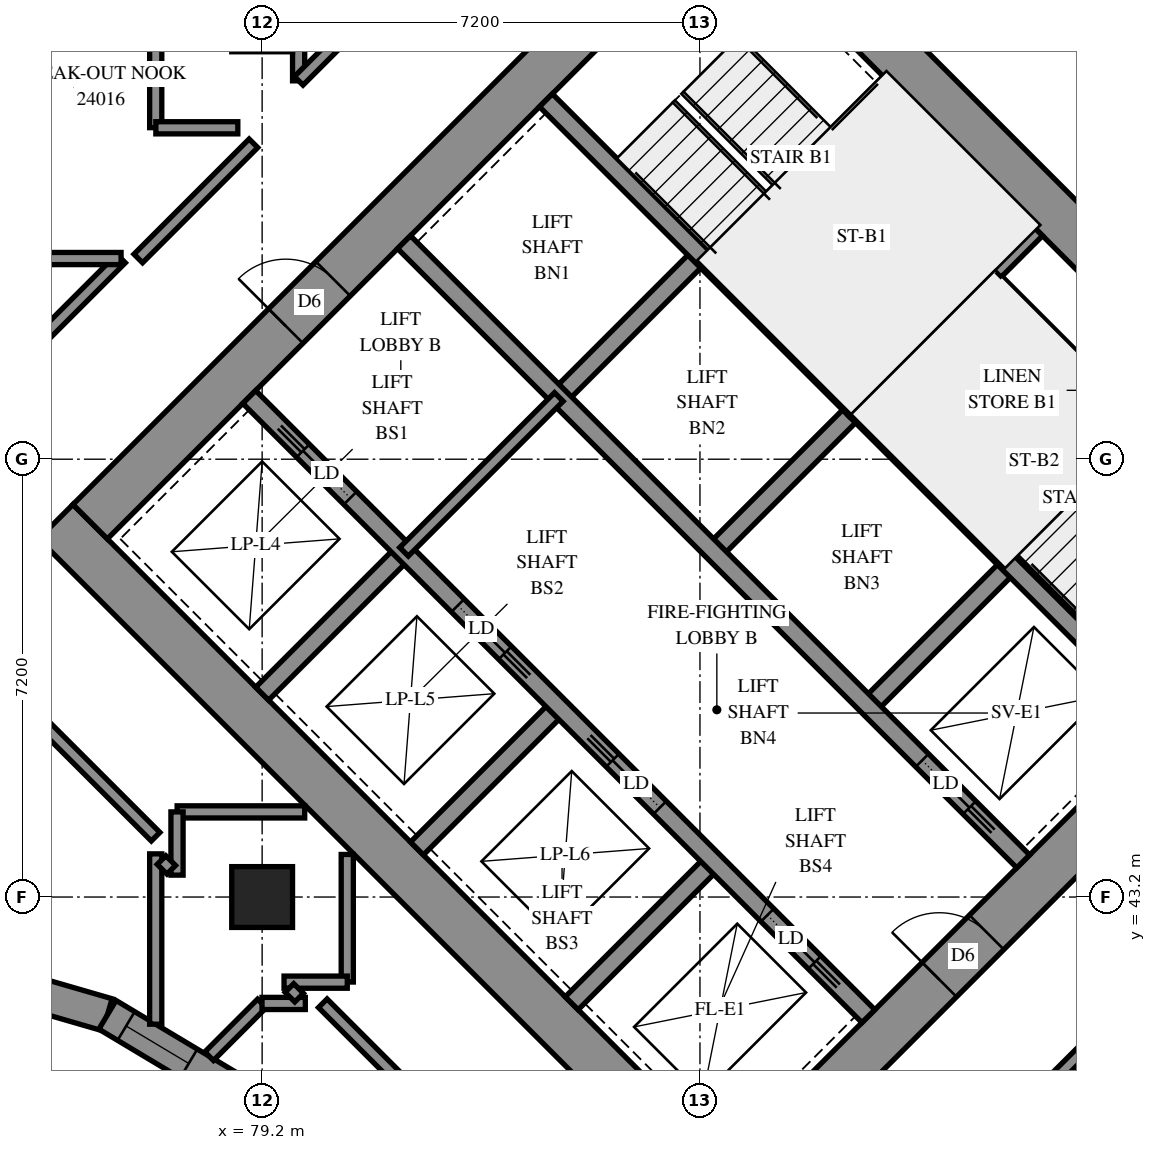
"""IFC4 building model, lengths in metres.
Left out: names, types, materials, properties, quantities, classifications, styles, units other than length and angle.
Written with IfcOpenShell. Run it as: python <this file> out.ifc"""

import sys

from ifc_helpers import new_model, si_unit, direction, frame, frame_2d, origin, origin_2d, place, context, subcontext, project, spatial, polyline, rectangle, outline, extrude, element, fill, save


model = new_model("IFC4")
c1 = context("Model", 3, precision=1e-05, world=origin(), true_north=direction((0.0, 1.0)))
c2 = subcontext(c1, "Body", "Model", "MODEL_VIEW")
j1 = project(units=[si_unit("LENGTHUNIT", "METRE"), si_unit("PLANEANGLEUNIT", "RADIAN")], contexts=[c1])
p1 = place(None, origin())
s1 = spatial("IfcSite", under=j1, at=p1, CompositionType="ELEMENT")
p2 = place(p1, origin())
s2 = spatial("IfcBuilding", under=s1, at=p2, CompositionType="ELEMENT")
p3 = place(p2, frame((0.0, 0.0, 91.4)))
s3 = spatial("IfcBuildingStorey", under=s2, at=p3, CompositionType="ELEMENT", Elevation=91.4)
p4 = place(p3, frame((79.2, 43.2, 0.0), z_axis=(0.0, 0.0, 1.0), x_axis=(1.0, 0.0, 0.0)))
e1 = element("IfcColumn", 1, at=p4, inside=s3, PredefinedType="COLUMN", context=c2, shape_type="SweptSolid", body=[
    extrude(rectangle(XDim=1.0, YDim=1.0, at=origin_2d()), origin(), (0.0, 0.0, 1.0), 3.1),
])
p5 = place(p3, frame((75.806, 49.373, -0.3), z_axis=(0.0, 0.0, 1.0), x_axis=(0.7071067812, -0.7071067812, 0.0)))
e2 = element("IfcWall", 2, at=p5, inside=s3, PredefinedType="SHEAR", context=c2, shape_type="SweptSolid", body=[
    extrude(rectangle(XDim=16.0, YDim=0.8, at=frame_2d((8.0, 0.0))), origin(), (0.0, 0.0, 1.0), 2.7),
])
p6 = place(p3, frame((86.554, 60.121, -0.3), z_axis=(0.0, 0.0, 1.0), x_axis=(0.7071067812, -0.7071067812, 0.0)))
e3 = element("IfcWall", 3, at=p6, inside=s3, PredefinedType="SHEAR", context=c2, shape_type="SweptSolid", body=[
    extrude(rectangle(XDim=16.0, YDim=0.8, at=frame_2d((8.0, 0.0))), origin(), (0.0, 0.0, 1.0), 2.7),
])
p7 = place(p6, frame((10.8, 0.0, 0.3)))
e4 = element("IfcOpeningElement", 4, at=p7, cuts=e3, PredefinedType="OPENING", context=c2, shape_type="SweptSolid", body=[
    extrude(rectangle(XDim=0.8, YDim=2.1, at=frame_2d((0.4, 1.05))), frame((0.0, 0.41, 0.0), z_axis=(0.0, -1.0, 0.0), x_axis=(1.0, 0.0, 0.0)), (0.0, 0.0, 1.0), 0.82),
])
p8 = place(p3, frame((76.372, 49.373, -0.3), z_axis=(0.0, 0.0, 1.0), x_axis=(0.7071067812, 0.7071067812, 0.0)))
e5 = element("IfcWall", 5, at=p8, inside=s3, PredefinedType="SHEAR", context=c2, shape_type="SweptSolid", body=[
    extrude(rectangle(XDim=14.4, YDim=0.8, at=frame_2d((7.2, 0.0))), origin(), (0.0, 0.0, 1.0), 2.7),
])
p9 = place(p8, frame((4.55, 0.0, 0.3)))
e6 = element("IfcOpeningElement", 6, at=p9, cuts=e5, PredefinedType="OPENING", context=c2, shape_type="SweptSolid", body=[
    extrude(rectangle(XDim=1.1, YDim=2.1, at=frame_2d((0.55, 1.05))), frame((0.0, 0.41, 0.0), z_axis=(0.0, -1.0, 0.0), x_axis=(1.0, 0.0, 0.0)), (0.0, 0.0, 1.0), 0.82),
])
p10 = place(p8, frame((11.35, 0.0, 0.3)))
e7 = element("IfcOpeningElement", 7, at=p10, cuts=e5, PredefinedType="OPENING", context=c2, shape_type="SweptSolid", body=[
    extrude(rectangle(XDim=1.1, YDim=2.1, at=frame_2d((0.55, 1.05))), frame((0.0, 0.41, 0.0), z_axis=(0.0, -1.0, 0.0), x_axis=(1.0, 0.0, 0.0)), (0.0, 0.0, 1.0), 0.82),
])
p11 = place(p3, frame((87.12, 38.625, -0.3), z_axis=(0.0, 0.0, 1.0), x_axis=(0.7071067812, 0.7071067812, 0.0)))
e8 = element("IfcWall", 8, at=p11, inside=s3, PredefinedType="SHEAR", context=c2, shape_type="SweptSolid", body=[
    extrude(rectangle(XDim=14.4, YDim=0.8, at=frame_2d((7.2, 0.0))), origin(), (0.0, 0.0, 1.0), 2.7),
])
p12 = place(p11, frame((4.55, 0.0, 0.3)))
e9 = element("IfcOpeningElement", 9, at=p12, cuts=e8, PredefinedType="OPENING", context=c2, shape_type="SweptSolid", body=[
    extrude(rectangle(XDim=1.1, YDim=2.1, at=frame_2d((0.55, 1.05))), frame((0.0, 0.41, 0.0), z_axis=(0.0, -1.0, 0.0), x_axis=(1.0, 0.0, 0.0)), (0.0, 0.0, 1.0), 0.82),
])
p13 = place(p11, frame((11.35, 0.0, 0.3)))
e10 = element("IfcOpeningElement", 10, at=p13, cuts=e8, PredefinedType="OPENING", context=c2, shape_type="SweptSolid", body=[
    extrude(rectangle(XDim=1.1, YDim=2.1, at=frame_2d((0.55, 1.05))), frame((0.0, 0.41, 0.0), z_axis=(0.0, -1.0, 0.0), x_axis=(1.0, 0.0, 0.0)), (0.0, 0.0, 1.0), 0.82),
])
for number, where, z_axis, x_axis in (
    (11, (79.2, 46.544, 0.0), (0.0, 0.0, 1.0), (0.707, 0.707, 0.0)),
    (12, (84.079, 51.423, 0.0), (0.0, 0.0, 1.0), (0.707, 0.707, 0.0)),
):
    element("IfcWall", number, at=place(p3, frame(where, z_axis=z_axis, x_axis=x_axis)), inside=s3, PredefinedType="SOLIDWALL", context=c2, shape_type="SweptSolid", body=[
        extrude(rectangle(XDim=3.3, YDim=0.3, at=frame_2d((1.65, 0.0))), origin(), (0.0, 0.0, 1.0), 3.1),
    ])
p14 = place(p3, frame((81.746, 43.999, 0.0), z_axis=(0.0, 0.0, 1.0), x_axis=(0.7071067812, 0.7071067812, 0.0)))
e13 = element("IfcWall", 13, at=p14, inside=s3, PredefinedType="SOLIDWALL", context=c2, shape_type="SweptSolid", body=[
    extrude(rectangle(XDim=3.3, YDim=0.3, at=frame_2d((1.65, 0.0))), origin(), (0.0, 0.0, 1.0), 3.1),
])
p15 = place(p3, frame((86.625, 48.878, 0.0), z_axis=(0.0, 0.0, 1.0), x_axis=(0.7071067812, 0.7071067812, 0.0)))
e14 = element("IfcWall", 14, at=p15, inside=s3, PredefinedType="SOLIDWALL", context=c2, shape_type="SweptSolid", body=[
    extrude(rectangle(XDim=3.3, YDim=0.3, at=frame_2d((1.65, 0.0))), origin(), (0.0, 0.0, 1.0), 3.1),
])
p16 = place(p3, frame((84.291, 41.453, 0.0), z_axis=(0.0, 0.0, 1.0), x_axis=(0.7071067812, 0.7071067812, 0.0)))
e15 = element("IfcWall", 15, at=p16, inside=s3, PredefinedType="SOLIDWALL", context=c2, shape_type="SweptSolid", body=[
    extrude(rectangle(XDim=3.3, YDim=0.3, at=frame_2d((1.65, 0.0))), origin(), (0.0, 0.0, 1.0), 3.1),
])
p17 = place(p3, frame((89.17, 46.332, 0.0), z_axis=(0.0, 0.0, 1.0), x_axis=(0.7071067812, 0.7071067812, 0.0)))
e16 = element("IfcWall", 16, at=p17, inside=s3, PredefinedType="SOLIDWALL", context=c2, shape_type="SweptSolid", body=[
    extrude(rectangle(XDim=3.3, YDim=0.3, at=frame_2d((1.65, 0.0))), origin(), (0.0, 0.0, 1.0), 3.1),
])
p18 = place(p3, frame((78.988, 51.423, 0.0), z_axis=(0.0, 0.0, 1.0), x_axis=(0.7071067812, -0.7071067812, 0.0)))
e17 = element("IfcWall", 17, at=p18, inside=s3, PredefinedType="SOLIDWALL", context=c2, shape_type="SweptSolid", body=[
    extrude(rectangle(XDim=14.4, YDim=0.3, at=frame_2d((7.2, 0.0))), origin(), (0.0, 0.0, 1.0), 3.1),
])
p19 = place(p18, frame((1.25, 0.0, 0.0)))
e18 = element("IfcOpeningElement", 18, at=p19, cuts=e17, PredefinedType="OPENING", context=c2, shape_type="SweptSolid", body=[
    extrude(rectangle(XDim=1.1, YDim=2.1, at=frame_2d((0.55, 1.05))), frame((0.0, 0.16, 0.0), z_axis=(0.0, -1.0, 0.0), x_axis=(1.0, 0.0, 0.0)), (0.0, 0.0, 1.0), 0.32),
])
p20 = place(p18, frame((4.85, 0.0, 0.0)))
e19 = element("IfcOpeningElement", 19, at=p20, cuts=e17, PredefinedType="OPENING", context=c2, shape_type="SweptSolid", body=[
    extrude(rectangle(XDim=1.1, YDim=2.1, at=frame_2d((0.55, 1.05))), frame((0.0, 0.16, 0.0), z_axis=(0.0, -1.0, 0.0), x_axis=(1.0, 0.0, 0.0)), (0.0, 0.0, 1.0), 0.32),
])
p21 = place(p18, frame((8.45, 0.0, 0.0)))
e20 = element("IfcOpeningElement", 20, at=p21, cuts=e17, PredefinedType="OPENING", context=c2, shape_type="SweptSolid", body=[
    extrude(rectangle(XDim=1.1, YDim=2.1, at=frame_2d((0.55, 1.05))), frame((0.0, 0.16, 0.0), z_axis=(0.0, -1.0, 0.0), x_axis=(1.0, 0.0, 0.0)), (0.0, 0.0, 1.0), 0.32),
])
p22 = place(p18, frame((12.05, 0.0, 0.0)))
e21 = element("IfcOpeningElement", 21, at=p22, cuts=e17, PredefinedType="OPENING", context=c2, shape_type="SweptSolid", body=[
    extrude(rectangle(XDim=1.1, YDim=2.1, at=frame_2d((0.55, 1.05))), frame((0.0, 0.16, 0.0), z_axis=(0.0, -1.0, 0.0), x_axis=(1.0, 0.0, 0.0)), (0.0, 0.0, 1.0), 0.32),
])
p23 = place(p3, frame((81.534, 53.969, 0.0), z_axis=(0.0, 0.0, 1.0), x_axis=(0.707103309, -0.7071102534, 0.0)))
e22 = element("IfcWall", 22, at=p23, inside=s3, PredefinedType="SOLIDWALL", context=c2, shape_type="SweptSolid", body=[
    extrude(rectangle(XDim=14.4, YDim=0.3, at=frame_2d((7.2, 0.0))), origin(), (0.0, 0.0, 1.0), 3.1),
])
p24 = place(p23, frame((12.05, 0.0, 0.0)))
e23 = element("IfcOpeningElement", 23, at=p24, cuts=e22, PredefinedType="OPENING", context=c2, shape_type="SweptSolid", body=[
    extrude(rectangle(XDim=1.1, YDim=2.1, at=frame_2d((0.55, 1.05))), frame((0.0, 0.16, 0.0), z_axis=(0.0, -1.0, 0.0), x_axis=(1.0, 0.0, 0.0)), (0.0, 0.0, 1.0), 0.32),
])
for number, where, z_axis, x_axis in (
    (24, (83.867, 56.302, 0.0), (0.0, 0.0, 1.0), (0.707, -0.707, 0.0)),
    (25, (88.958, 51.211, 0.0), (0.0, 0.0, 1.0), (0.707, -0.707, 0.0)),
):
    element("IfcWall", number, at=place(p3, frame(where, z_axis=z_axis, x_axis=x_axis)), inside=s3, PredefinedType="SOLIDWALL", context=c2, shape_type="SweptSolid", body=[
        extrude(rectangle(XDim=7.2, YDim=0.3, at=frame_2d((3.6, 0.0))), origin(), (0.0, 0.0, 1.0), 3.1),
    ])
p25 = place(p3, frame((88.958, 51.211, 0.0), z_axis=(0.0, 0.0, 1.0), x_axis=(0.7071067812, 0.7071067812, 0.0)))
e26 = element("IfcWall", 26, at=p25, inside=s3, PredefinedType="SOLIDWALL", context=c2, shape_type="SweptSolid", body=[
    extrude(rectangle(XDim=4.2, YDim=0.3, at=frame_2d((2.1, 0.0))), origin(), (0.0, 0.0, 1.0), 3.1),
])
p26 = place(p3, frame((73.151, 42.279, 0.0), z_axis=(0.0, 0.0, 1.0), x_axis=(0.9604465079, -0.2784645497, 0.0)))
e27 = element("IfcWall", 27, at=p26, inside=s3, PredefinedType="SOLIDWALL", context=c2, shape_type="SweptSolid", body=[
    extrude(outline(polyline([(0.055, -0.275), (3.614, -0.275), (3.685, 0.275), (-0.055, 0.275), (0.055, -0.275)])), origin(), (0.0, 0.0, 1.0), 3.1),
])
p27 = place(p26, frame((0.775, 0.0, 0.5)))
e28 = element("IfcOpeningElement", 28, at=p27, cuts=e27, PredefinedType="OPENING", context=c2, shape_type="SweptSolid", body=[
    extrude(rectangle(XDim=1.2, YDim=2.45, at=frame_2d((0.6, 1.225))), frame((0.0, 0.285, 0.0), z_axis=(0.0, -1.0, 0.0), x_axis=(1.0, 0.0, 0.0)), (0.0, 0.0, 1.0), 0.57),
])
p28 = place(p3, frame((76.656, 41.263, 0.0), z_axis=(0.0, 0.0, 1.0), x_axis=(0.8580683787, -0.513535449, 0.0)))
e29 = element("IfcWall", 29, at=p28, inside=s3, PredefinedType="SOLIDWALL", context=c2, shape_type="SweptSolid", body=[
    extrude(outline(polyline([(0.036, -0.275), (4.104, -0.275), (4.199, 0.275), (-0.036, 0.275), (0.036, -0.275)])), origin(), (0.0, 0.0, 1.0), 3.1),
])
p29 = place(p28, frame((0.358, 0.0, 0.5)))
e30 = element("IfcOpeningElement", 30, at=p29, cuts=e29, PredefinedType="OPENING", context=c2, shape_type="SweptSolid", body=[
    extrude(rectangle(XDim=1.2, YDim=2.45, at=frame_2d((0.6, 1.225))), frame((0.0, 0.285, 0.0), z_axis=(0.0, -1.0, 0.0), x_axis=(1.0, 0.0, 0.0)), (0.0, 0.0, 1.0), 0.57),
])
p30 = place(p28, frame((2.234, 0.0, 0.5)))
e31 = element("IfcOpeningElement", 31, at=p30, cuts=e29, PredefinedType="OPENING", context=c2, shape_type="SweptSolid", body=[
    extrude(rectangle(XDim=1.2, YDim=2.45, at=frame_2d((0.6, 1.225))), frame((0.0, 0.285, 0.0), z_axis=(0.0, -1.0, 0.0), x_axis=(1.0, 0.0, 0.0)), (0.0, 0.0, 1.0), 0.57),
])
p31 = place(p3, frame((91.313, 53.354, 0.0), z_axis=(0.0, 0.0, 1.0), x_axis=(0.7071147811, -0.7070987812, 0.0)))
e32 = element("IfcWall", 32, at=p31, inside=s3, PredefinedType="PARTITIONING", context=c2, shape_type="SweptSolid", body=[
    extrude(rectangle(XDim=6.25, YDim=0.15, at=frame_2d((3.125, 0.0))), origin(), (0.0, 0.0, 1.0), 3.1),
])
p32 = place(p3, frame((81.534, 48.878, 0.0), z_axis=(0.0, 0.0, 1.0), x_axis=(0.707092892, 0.7071206701, 0.0)))
e33 = element("IfcWall", 33, at=p32, inside=s3, PredefinedType="PARTITIONING", context=c2, shape_type="SweptSolid", body=[
    extrude(rectangle(XDim=3.6, YDim=0.2, at=frame_2d((1.8, 0.0))), origin(), (0.0, 0.0, 1.0), 3.1),
])
p33 = place(p3, frame((86.835, 34.806, 0.0), z_axis=(0.0, 0.0, 1.0), x_axis=(0.7071067812, 0.7071067812, 0.0)))
e34 = element("IfcWall", 34, at=p33, inside=s3, PredefinedType="PARTITIONING", context=c2, shape_type="SweptSolid", body=[
    extrude(rectangle(XDim=9.201, YDim=0.2, at=frame_2d((4.601, 0.0))), origin(), (0.0, 0.0, 1.0), 3.1),
])
p34 = place(p3, frame((88.889, 61.315, 0.0), z_axis=(0.0, 0.0, 1.0), x_axis=(0.7071067812, -0.7071067812, 0.0)))
e35 = element("IfcWall", 35, at=p34, inside=s3, PredefinedType="PARTITIONING", context=c2, shape_type="SweptSolid", body=[
    extrude(rectangle(XDim=7.187, YDim=0.2, at=frame_2d((3.594, 0.0))), origin(), (0.0, 0.0, 1.0), 3.1),
])
p35 = place(p3, frame((80.197, 41.453, 0.0), z_axis=(0.0, 0.0, 1.0), x_axis=(0.7071067812, -0.7071067812, 0.0)))
e36 = element("IfcWall", 36, at=p35, inside=s3, PredefinedType="PARTITIONING", context=c2, shape_type="SweptSolid", body=[
    extrude(rectangle(XDim=6.488, YDim=0.2, at=frame_2d((3.244, 0.0))), origin(), (0.0, 0.0, 1.0), 3.1),
])
p36 = place(p3, frame((77.45, 41.109, 0.0), z_axis=(0.0, 0.0, 1.0), x_axis=(0.0, 1.0, 0.0)))
e37 = element("IfcWall", 37, at=p36, inside=s3, PredefinedType="PARTITIONING", context=c2, shape_type="SweptSolid", body=[
    extrude(rectangle(XDim=2.801, YDim=0.2, at=frame_2d((1.401, 0.0))), origin(), (0.0, 0.0, 1.0), 3.1),
])
p37 = place(p3, frame((79.8, 56.622, 0.0), z_axis=(0.0, 0.0, 1.0), x_axis=(0.0, 1.0, 0.0)))
e38 = element("IfcWall", 38, at=p37, inside=s3, PredefinedType="PARTITIONING", context=c2, shape_type="SweptSolid", body=[
    extrude(rectangle(XDim=2.728, YDim=0.2, at=frame_2d((1.364, 0.0))), origin(), (0.0, 0.0, 1.0), 3.1),
])
p38 = place(p3, frame((77.163, 53.701, 0.0), z_axis=(0.0, 0.0, 1.0), x_axis=(0.7071067812, 0.7071067812, 0.0)))
e39 = element("IfcWall", 39, at=p38, inside=s3, PredefinedType="PARTITIONING", context=c2, shape_type="SweptSolid", body=[
    extrude(rectangle(XDim=2.679, YDim=0.2, at=frame_2d((1.339, 0.0))), origin(), (0.0, 0.0, 1.0), 3.1),
])
p39 = place(p3, frame((75.598, 46.04, 0.0), z_axis=(0.0, 0.0, 1.0), x_axis=(0.7074891043, -0.7067242512, 0.0)))
e40 = element("IfcWall", 40, at=p39, inside=s3, PredefinedType="PARTITIONING", context=c2, shape_type="SweptSolid", body=[
    extrude(rectangle(XDim=2.615, YDim=0.2, at=frame_2d((1.308, 0.0))), origin(), (0.0, 0.0, 1.0), 3.1),
])
p40 = place(p3, frame((75.102, 51.922, 0.0), z_axis=(0.0, 0.0, 1.0), x_axis=(0.7071067812, 0.7071067812, 0.0)))
e41 = element("IfcWall", 41, at=p40, inside=s3, PredefinedType="PARTITIONING", context=c2, shape_type="SweptSolid", body=[
    extrude(rectangle(XDim=2.514, YDim=0.2, at=frame_2d((1.257, 0.0))), origin(), (0.0, 0.0, 1.0), 3.1),
])
p41 = place(p3, frame((92.143, 39.117, 0.0), z_axis=(0.0, 0.0, 1.0), x_axis=(0.7075233388, 0.706689978, 0.0)))
e42 = element("IfcWall", 42, at=p41, inside=s3, PredefinedType="PARTITIONING", context=c2, shape_type="SweptSolid", body=[
    extrude(rectangle(XDim=2.4, YDim=0.15, at=frame_2d((1.2, 0.0))), origin(), (0.0, 0.0, 1.0), 3.1),
])
for number, where, z_axis, x_axis in (
    (43, (77.802, 44.6, 0.0), (0.0, 0.0, 1.0), (1.0, 0.0, 0.0)),
    (44, (80.6, 41.802, 0.0), (0.0, 0.0, 1.0), (0.0, 1.0, 0.0)),
):
    element("IfcWall", number, at=place(p3, frame(where, z_axis=z_axis, x_axis=x_axis)), inside=s3, PredefinedType="PARTITIONING", context=c2, shape_type="SweptSolid", body=[
        extrude(rectangle(XDim=2.098, YDim=0.2, at=frame_2d((1.049, 0.0))), origin(), (0.0, 0.0, 1.0), 3.1),
    ])
p42 = place(p3, frame((75.1, 53.7, 0.0), z_axis=(0.0, 0.0, 1.0), x_axis=(1.0, 0.0, 0.0)))
e45 = element("IfcWall", 45, at=p42, inside=s3, PredefinedType="PARTITIONING", context=c2, shape_type="SweptSolid", body=[
    extrude(rectangle(XDim=1.78, YDim=0.2, at=frame_2d((0.89, 0.0))), origin(), (0.0, 0.0, 1.0), 3.1),
])
p43 = place(p3, frame((79.802, 56.623, 0.0), z_axis=(0.0, 0.0, 1.0), x_axis=(0.7071067812, 0.7071067812, 0.0)))
e46 = element("IfcWall", 46, at=p43, inside=s3, PredefinedType="PARTITIONING", context=c2, shape_type="SweptSolid", body=[
    extrude(rectangle(XDim=1.623, YDim=0.2, at=frame_2d((0.812, 0.0))), origin(), (0.0, 0.0, 1.0), 3.1),
])
for number, where, z_axis, x_axis in (
    (47, (77.45, 55.852, 0.0), (0.0, 0.0, 1.0), (0.0, 1.0, 0.0)),
    (48, (77.452, 55.85, 0.0), (0.0, 0.0, 1.0), (1.0, 0.0, 0.0)),
):
    element("IfcWall", number, at=place(p3, frame(where, z_axis=z_axis, x_axis=x_axis)), inside=s3, PredefinedType="PARTITIONING", context=c2, shape_type="SweptSolid", body=[
        extrude(rectangle(XDim=1.348, YDim=0.2, at=frame_2d((0.674, 0.0))), origin(), (0.0, 0.0, 1.0), 3.1),
    ])
p44 = place(p3, frame((78.328, 40.583, 0.0), z_axis=(0.0, 0.0, 1.0), x_axis=(0.7071067812, 0.7071067812, 0.0)))
e49 = element("IfcWall", 49, at=p44, inside=s3, PredefinedType="PARTITIONING", context=c2, shape_type="SweptSolid", body=[
    extrude(rectangle(XDim=1.227, YDim=0.2, at=frame_2d((0.613, 0.0))), origin(), (0.0, 0.0, 1.0), 3.1),
])
for number, where, z_axis, x_axis in (
    (50, (77.8, 43.56, 0.0), (0.0, 0.0, 1.0), (0.0, 1.0, 0.0)),
    (51, (79.56, 41.8, 0.0), (0.0, 0.0, 1.0), (1.0, 0.0, 0.0)),
):
    element("IfcWall", number, at=place(p3, frame(where, z_axis=z_axis, x_axis=x_axis)), inside=s3, PredefinedType="PARTITIONING", context=c2, shape_type="SweptSolid", body=[
        extrude(rectangle(XDim=1.04, YDim=0.2, at=frame_2d((0.52, 0.0))), origin(), (0.0, 0.0, 1.0), 3.1),
    ])
p45 = place(p3, frame((79.198, 41.45, 0.0), z_axis=(0.0, 0.0, 1.0), x_axis=(1.0, 0.0, 0.0)))
e52 = element("IfcWall", 52, at=p45, inside=s3, PredefinedType="PARTITIONING", context=c2, shape_type="SweptSolid", body=[
    extrude(rectangle(XDim=0.712, YDim=0.2, at=frame_2d((0.356, 0.0))), origin(), (0.0, 0.0, 1.0), 3.1),
])
for number, where, z_axis, x_axis in (
    (53, (79.649, 41.705, 0.0), (0.0, 0.0, 1.0), (0.707, -0.707, 0.0)),
    (54, (77.546, 43.808, 0.0), (0.0, 0.0, 1.0), (0.707, -0.707, 0.0)),
):
    element("IfcWall", number, at=place(p3, frame(where, z_axis=z_axis, x_axis=x_axis)), inside=s3, PredefinedType="PARTITIONING", context=c2, shape_type="SweptSolid", body=[
        extrude(rectangle(XDim=0.225, YDim=0.2, at=frame_2d((0.112, 0.0))), origin(), (0.0, 0.0, 1.0), 3.1),
    ])
p46 = place(p29, origin())
e55 = element("IfcWindow", 55, at=p46, inside=s3, PartitioningType="SINGLE_PANEL", PredefinedType="WINDOW", context=c2, shape_type="SweptSolid", body=[
    extrude(rectangle(XDim=1.2, YDim=2.45, at=frame_2d((0.6, 1.225))), frame((0.0, 0.155, 0.0), z_axis=(0.0, -1.0, 0.0), x_axis=(1.0, 0.0, 0.0)), (0.0, 0.0, 1.0), 0.06),
])
fill(e30, e55)
p47 = place(p9, origin())
e56 = element("IfcDoor", 56, at=p47, inside=s3, OperationType="DOUBLE_DOOR_SINGLE_SWING", PredefinedType="DOOR", context=c2, shape_type="SweptSolid", body=[
    extrude(rectangle(XDim=1.1, YDim=2.1, at=frame_2d((0.55, 1.05))), frame((0.0, 0.025, 0.0), z_axis=(0.0, -1.0, 0.0), x_axis=(1.0, 0.0, 0.0)), (0.0, 0.0, 1.0), 0.05),
])
fill(e6, e56)
p48 = place(p12, origin())
e57 = element("IfcDoor", 57, at=p48, inside=s3, OperationType="DOUBLE_DOOR_SINGLE_SWING", PredefinedType="DOOR", context=c2, shape_type="SweptSolid", body=[
    extrude(rectangle(XDim=1.1, YDim=2.1, at=frame_2d((0.55, 1.05))), frame((0.0, 0.025, 0.0), z_axis=(0.0, -1.0, 0.0), x_axis=(1.0, 0.0, 0.0)), (0.0, 0.0, 1.0), 0.05),
])
fill(e9, e57)
p49 = place(p19, origin())
e58 = element("IfcDoor", 58, at=p49, inside=s3, OperationType="SLIDING_TO_LEFT", PredefinedType="DOOR", context=c2, shape_type="SweptSolid", body=[
    extrude(rectangle(XDim=1.1, YDim=2.1, at=frame_2d((0.55, 1.05))), frame((0.0, 0.025, 0.0), z_axis=(0.0, -1.0, 0.0), x_axis=(1.0, 0.0, 0.0)), (0.0, 0.0, 1.0), 0.05),
])
fill(e18, e58)
p50 = place(p20, origin())
e59 = element("IfcDoor", 59, at=p50, inside=s3, OperationType="SLIDING_TO_RIGHT", PredefinedType="DOOR", context=c2, shape_type="SweptSolid", body=[
    extrude(rectangle(XDim=1.1, YDim=2.1, at=frame_2d((0.55, 1.05))), frame((0.0, 0.025, 0.0), z_axis=(0.0, -1.0, 0.0), x_axis=(1.0, 0.0, 0.0)), (0.0, 0.0, 1.0), 0.05),
])
fill(e19, e59)
p51 = place(p21, origin())
e60 = element("IfcDoor", 60, at=p51, inside=s3, OperationType="SLIDING_TO_LEFT", PredefinedType="DOOR", context=c2, shape_type="SweptSolid", body=[
    extrude(rectangle(XDim=1.1, YDim=2.1, at=frame_2d((0.55, 1.05))), frame((0.0, 0.025, 0.0), z_axis=(0.0, -1.0, 0.0), x_axis=(1.0, 0.0, 0.0)), (0.0, 0.0, 1.0), 0.05),
])
fill(e20, e60)
p52 = place(p22, origin())
e61 = element("IfcDoor", 61, at=p52, inside=s3, OperationType="SLIDING_TO_RIGHT", PredefinedType="DOOR", context=c2, shape_type="SweptSolid", body=[
    extrude(rectangle(XDim=1.1, YDim=2.1, at=frame_2d((0.55, 1.05))), frame((0.0, 0.025, 0.0), z_axis=(0.0, -1.0, 0.0), x_axis=(1.0, 0.0, 0.0)), (0.0, 0.0, 1.0), 0.05),
])
fill(e21, e61)
p53 = place(p24, origin())
e62 = element("IfcDoor", 62, at=p53, inside=s3, OperationType="SLIDING_TO_RIGHT", PredefinedType="DOOR", context=c2, shape_type="SweptSolid", body=[
    extrude(rectangle(XDim=1.1, YDim=2.1, at=frame_2d((0.55, 1.05))), frame((0.0, 0.025, 0.0), z_axis=(0.0, -1.0, 0.0), x_axis=(1.0, 0.0, 0.0)), (0.0, 0.0, 1.0), 0.05),
])
fill(e23, e62)
save(model, sys.argv[1])
